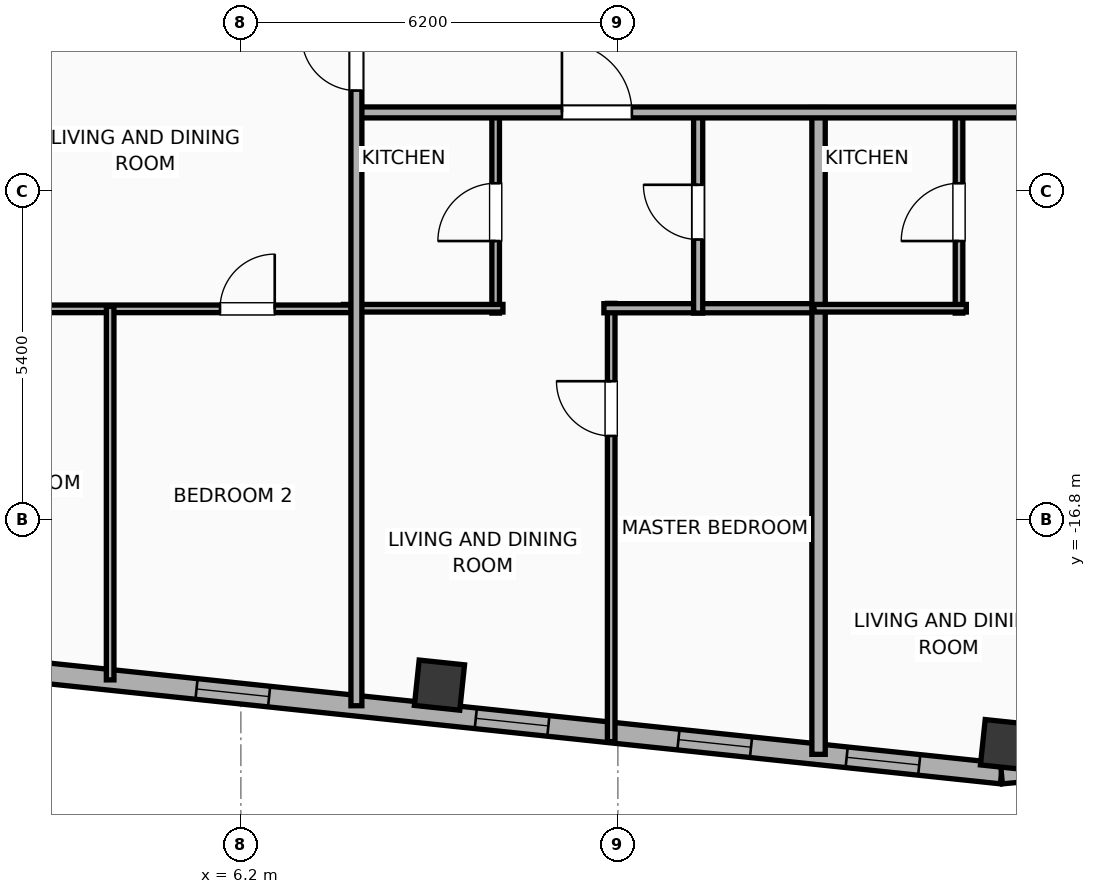
"""IFC4 building model, lengths in metres.
Left out: names, types, materials, properties, quantities, classifications, styles, units other than length and angle.
Written with IfcOpenShell. Run it as: python <this file> out.ifc"""

import sys

from ifc_helpers import new_model, si_unit, direction, frame, frame_2d, origin, origin_2d, place, context, subcontext, project, spatial, rectangle, hollow_rectangle, extrude, element, fill, save


model = new_model("IFC4")
c1 = context("Model", 3, precision=1e-05, world=origin(), true_north=direction((0.0, 1.0)))
c2 = subcontext(c1, "Body", "Model", "MODEL_VIEW")
j1 = project(units=[si_unit("LENGTHUNIT", "METRE"), si_unit("PLANEANGLEUNIT", "RADIAN")], contexts=[c1])
p1 = place(None, origin())
s1 = spatial("IfcSite", under=j1, at=p1, CompositionType="ELEMENT")
p2 = place(p1, origin())
s2 = spatial("IfcBuilding", under=s1, at=p2, CompositionType="ELEMENT")
p3 = place(p2, frame((0.0, 0.0, 260.0)))
s3 = spatial("IfcBuildingStorey", under=s2, at=p3, CompositionType="ELEMENT", Elevation=260.0)
for number, where, z_axis, x_axis in (
    (1, (9.466, -19.518, 0.0), (0.0, 0.0, 1.0), (0.995, -0.105, 0.0)),
    (2, (18.775, -20.497, 0.0), (0.0, 0.0, 1.0), (0.995, -0.105, 0.0)),
):
    element("IfcColumn", number, at=place(p3, frame(where, z_axis=z_axis, x_axis=x_axis)), inside=s3, PredefinedType="COLUMN", context=c2, shape_type="SweptSolid", body=[
        extrude(hollow_rectangle(XDim=0.75, YDim=0.75, WallThickness=0.025, at=origin_2d()), origin(), (0.0, 0.0, 1.0), 3.9),
    ])
p4 = place(p3, frame((18.708, -20.972, 0.0), z_axis=(0.0, 0.0, 1.0), x_axis=(-0.994521888554, 0.104528528102, 0.0)))
e3 = element("IfcWall", 3, at=p4, inside=s3, PredefinedType="ELEMENTEDWALL", context=c2, shape_type="SweptSolid", body=[
    extrude(rectangle(XDim=46.766, YDim=0.34, at=frame_2d((23.383, 0.0))), origin(), (0.0, 0.0, 1.0), 2.54),
])
p5 = place(p4, frame((23.833, 0.0, 0.75)))
e4 = element("IfcOpeningElement", 4, at=p5, cuts=e3, PredefinedType="OPENING", context=c2, shape_type="SweptSolid", body=[
    extrude(rectangle(XDim=2.4, YDim=1.63, at=frame_2d((1.2, 0.815))), frame((0.0, 0.18, 0.0), z_axis=(0.0, -1.0, 0.0), x_axis=(1.0, 0.0, 0.0)), (0.0, 0.0, 1.0), 0.36),
])
p6 = place(p4, frame((38.622, 0.0, 0.75)))
e5 = element("IfcOpeningElement", 5, at=p6, cuts=e3, PredefinedType="OPENING", context=c2, shape_type="SweptSolid", body=[
    extrude(rectangle(XDim=2.4, YDim=1.63, at=frame_2d((1.2, 0.815))), frame((0.0, 0.18, 0.0), z_axis=(0.0, -1.0, 0.0), x_axis=(1.0, 0.0, 0.0)), (0.0, 0.0, 1.0), 0.36),
])
p7 = place(p4, frame((44.402, 0.0, 0.75)))
e6 = element("IfcOpeningElement", 6, at=p7, cuts=e3, PredefinedType="OPENING", context=c2, shape_type="SweptSolid", body=[
    extrude(rectangle(XDim=1.2, YDim=1.63, at=frame_2d((0.6, 0.815))), frame((0.0, 0.18, 0.0), z_axis=(0.0, -1.0, 0.0), x_axis=(1.0, 0.0, 0.0)), (0.0, 0.0, 1.0), 0.36),
])
p8 = place(p4, frame((42.406, 0.0, 0.75)))
e7 = element("IfcOpeningElement", 7, at=p8, cuts=e3, PredefinedType="OPENING", context=c2, shape_type="SweptSolid", body=[
    extrude(rectangle(XDim=1.2, YDim=1.63, at=frame_2d((0.6, 0.815))), frame((0.0, 0.18, 0.0), z_axis=(0.0, -1.0, 0.0), x_axis=(1.0, 0.0, 0.0)), (0.0, 0.0, 1.0), 0.36),
])
p9 = place(p4, frame((34.933, 0.0, 0.75)))
e8 = element("IfcOpeningElement", 8, at=p9, cuts=e3, PredefinedType="OPENING", context=c2, shape_type="SweptSolid", body=[
    extrude(rectangle(XDim=1.2, YDim=1.63, at=frame_2d((0.6, 0.815))), frame((0.0, 0.18, 0.0), z_axis=(0.0, -1.0, 0.0), x_axis=(1.0, 0.0, 0.0)), (0.0, 0.0, 1.0), 0.36),
])
p10 = place(p4, frame((28.631, 0.0, 0.75)))
e9 = element("IfcOpeningElement", 9, at=p10, cuts=e3, PredefinedType="OPENING", context=c2, shape_type="SweptSolid", body=[
    extrude(rectangle(XDim=1.2, YDim=1.63, at=frame_2d((0.6, 0.815))), frame((0.0, 0.18, 0.0), z_axis=(0.0, -1.0, 0.0), x_axis=(1.0, 0.0, 0.0)), (0.0, 0.0, 1.0), 0.36),
])
p11 = place(p4, frame((30.896, 0.0, 0.75)))
e10 = element("IfcOpeningElement", 10, at=p11, cuts=e3, PredefinedType="OPENING", context=c2, shape_type="SweptSolid", body=[
    extrude(rectangle(XDim=1.2, YDim=1.63, at=frame_2d((0.6, 0.815))), frame((0.0, 0.18, 0.0), z_axis=(0.0, -1.0, 0.0), x_axis=(1.0, 0.0, 0.0)), (0.0, 0.0, 1.0), 0.36),
])
p12 = place(p4, frame((7.492, 0.0, 0.75)))
e11 = element("IfcOpeningElement", 11, at=p12, cuts=e3, PredefinedType="OPENING", context=c2, shape_type="SweptSolid", body=[
    extrude(rectangle(XDim=1.2, YDim=1.63, at=frame_2d((0.6, 0.815))), frame((0.0, 0.18, 0.0), z_axis=(0.0, -1.0, 0.0), x_axis=(1.0, 0.0, 0.0)), (0.0, 0.0, 1.0), 0.36),
])
p13 = place(p4, frame((4.141, 0.0, 0.75)))
e12 = element("IfcOpeningElement", 12, at=p13, cuts=e3, PredefinedType="OPENING", context=c2, shape_type="SweptSolid", body=[
    extrude(rectangle(XDim=1.2, YDim=1.63, at=frame_2d((0.6, 0.815))), frame((0.0, 0.18, 0.0), z_axis=(0.0, -1.0, 0.0), x_axis=(1.0, 0.0, 0.0)), (0.0, 0.0, 1.0), 0.36),
])
p14 = place(p4, frame((1.36, 0.0, 0.75)))
e13 = element("IfcOpeningElement", 13, at=p14, cuts=e3, PredefinedType="OPENING", context=c2, shape_type="SweptSolid", body=[
    extrude(rectangle(XDim=1.2, YDim=1.63, at=frame_2d((0.6, 0.815))), frame((0.0, 0.18, 0.0), z_axis=(0.0, -1.0, 0.0), x_axis=(1.0, 0.0, 0.0)), (0.0, 0.0, 1.0), 0.36),
])
p15 = place(p4, frame((20.254, 0.0, 0.75)))
e14 = element("IfcOpeningElement", 14, at=p15, cuts=e3, PredefinedType="OPENING", context=c2, shape_type="SweptSolid", body=[
    extrude(rectangle(XDim=1.2, YDim=1.63, at=frame_2d((0.6, 0.815))), frame((0.0, 0.18, 0.0), z_axis=(0.0, -1.0, 0.0), x_axis=(1.0, 0.0, 0.0)), (0.0, 0.0, 1.0), 0.36),
])
p16 = place(p4, frame((16.172, 0.0, 0.75)))
e15 = element("IfcOpeningElement", 15, at=p16, cuts=e3, PredefinedType="OPENING", context=c2, shape_type="SweptSolid", body=[
    extrude(rectangle(XDim=1.2, YDim=1.63, at=frame_2d((0.6, 0.815))), frame((0.0, 0.18, 0.0), z_axis=(0.0, -1.0, 0.0), x_axis=(1.0, 0.0, 0.0)), (0.0, 0.0, 1.0), 0.36),
])
p17 = place(p4, frame((12.11, 0.0, 0.75)))
e16 = element("IfcOpeningElement", 16, at=p17, cuts=e3, PredefinedType="OPENING", context=c2, shape_type="SweptSolid", body=[
    extrude(rectangle(XDim=1.2, YDim=1.63, at=frame_2d((0.6, 0.815))), frame((0.0, 0.18, 0.0), z_axis=(0.0, -1.0, 0.0), x_axis=(1.0, 0.0, 0.0)), (0.0, 0.0, 1.0), 0.36),
])
p18 = place(p3, frame((20.056, -20.848, 0.0), z_axis=(0.0, 0.0, 1.0), x_axis=(-0.995813013343, -0.091413579172, 0.0)))
e17 = element("IfcWall", 17, at=p18, inside=s3, PredefinedType="ELEMENTEDWALL", context=c2, shape_type="SweptSolid", body=[
    extrude(rectangle(XDim=1.354, YDim=0.34, at=frame_2d((0.677, 0.0))), origin(), (0.0, 0.0, 1.0), 2.54),
])
p19 = place(p3, frame((12.29, -20.448, 0.0), z_axis=(0.0, 0.0, 1.0), x_axis=(0.0, 1.0, 0.0)))
e18 = element("IfcWall", 18, at=p19, inside=s3, PredefinedType="PARTITIONING", context=c2, shape_type="SweptSolid", body=[
    extrude(rectangle(XDim=7.208, YDim=0.125, at=frame_2d((3.604, 0.0))), origin(), (0.0, 0.0, 1.0), 3.65),
])
p20 = place(p19, frame((5.028, 0.0, 0.0)))
e19 = element("IfcOpeningElement", 19, at=p20, cuts=e18, PredefinedType="OPENING", context=c2, shape_type="SweptSolid", body=[
    extrude(rectangle(XDim=0.9, YDim=2.05, at=frame_2d((0.45, 1.025))), frame((0.0, 0.073, 0.0), z_axis=(0.0, -1.0, 0.0), x_axis=(1.0, 0.0, 0.0)), (0.0, 0.0, 1.0), 0.145),
])
p21 = place(p3, frame((12.17, -13.32, 0.0), z_axis=(0.0, 0.0, 1.0), x_axis=(1.0, 0.0, 0.0)))
e20 = element("IfcWall", 20, at=p21, inside=s3, PredefinedType="PLUMBINGWALL", context=c2, shape_type="SweptSolid", body=[
    extrude(rectangle(XDim=3.605, YDim=0.15, at=frame_2d((1.802, 0.0))), origin(), (0.0, 0.0, 1.0), 3.65),
])
p22 = place(p3, frame((10.39, -13.4, 0.0), z_axis=(0.0, 0.0, 1.0), x_axis=(0.0, 1.0, 0.0)))
e21 = element("IfcWall", 21, at=p22, inside=s3, PredefinedType="PARTITIONING", context=c2, shape_type="SweptSolid", body=[
    extrude(rectangle(XDim=3.32, YDim=0.125, at=frame_2d((1.66, 0.0))), origin(), (0.0, 0.0, 1.0), 2.54),
])
p23 = place(p22, frame((1.185, 0.0, 0.0)))
e22 = element("IfcOpeningElement", 22, at=p23, cuts=e21, PredefinedType="OPENING", context=c2, shape_type="SweptSolid", body=[
    extrude(rectangle(XDim=0.95, YDim=2.05, at=frame_2d((0.475, 1.025))), frame((0.0, 0.073, 0.0), z_axis=(0.0, -1.0, 0.0), x_axis=(1.0, 0.0, 0.0)), (0.0, 0.0, 1.0), 0.145),
])
p24 = place(p3, frame((7.887, -13.32, 0.0), z_axis=(0.0, 0.0, 1.0), x_axis=(1.0, 0.0, 0.0)))
e23 = element("IfcWall", 23, at=p24, inside=s3, PredefinedType="PARTITIONING", context=c2, shape_type="SweptSolid", body=[
    extrude(rectangle(XDim=2.623, YDim=0.125, at=frame_2d((1.311, 0.0))), origin(), (0.0, 0.0, 1.0), 3.65),
])
p25 = place(p3, frame((13.72, -13.4, 0.0), z_axis=(0.0, 0.0, 1.0), x_axis=(0.0, 1.0, 0.0)))
e24 = element("IfcWall", 24, at=p25, inside=s3, PredefinedType="PLUMBINGWALL", context=c2, shape_type="SweptSolid", body=[
    extrude(rectangle(XDim=3.32, YDim=0.15, at=frame_2d((1.66, 0.0))), origin(), (0.0, 0.0, 1.0), 3.65),
])
p26 = place(p25, frame((1.21, 0.0, 0.0)))
e25 = element("IfcOpeningElement", 25, at=p26, cuts=e24, PredefinedType="OPENING", context=c2, shape_type="SweptSolid", body=[
    extrude(rectangle(XDim=0.9, YDim=2.05, at=frame_2d((0.45, 1.025))), frame((0.0, 0.085, 0.0), z_axis=(0.0, -1.0, 0.0), x_axis=(1.0, 0.0, 0.0)), (0.0, 0.0, 1.0), 0.17),
])
p27 = place(p3, frame((15.7, -20.656, 0.0), z_axis=(0.0, 0.0, 1.0), x_axis=(0.0, 1.0, 0.0)))
e26 = element("IfcWall", 26, at=p27, inside=s3, PredefinedType="PARTITIONING", context=c2, shape_type="SweptSolid", body=[
    extrude(rectangle(XDim=10.636, YDim=0.22, at=frame_2d((5.318, 0.0))), origin(), (0.0, 0.0, 1.0), 3.65),
])
p28 = place(p3, frame((18.01, -13.4, 0.0), z_axis=(0.0, 0.0, 1.0), x_axis=(0.0, 1.0, 0.0)))
e27 = element("IfcWall", 27, at=p28, inside=s3, PredefinedType="PARTITIONING", context=c2, shape_type="SweptSolid", body=[
    extrude(rectangle(XDim=3.32, YDim=0.125, at=frame_2d((1.66, 0.0))), origin(), (0.0, 0.0, 1.0), 3.65),
])
p29 = place(p28, frame((1.185, 0.0, 0.0)))
e28 = element("IfcOpeningElement", 28, at=p29, cuts=e27, PredefinedType="OPENING", context=c2, shape_type="SweptSolid", body=[
    extrude(rectangle(XDim=0.95, YDim=2.05, at=frame_2d((0.475, 1.025))), frame((0.0, 0.073, 0.0), z_axis=(0.0, -1.0, 0.0), x_axis=(1.0, 0.0, 0.0)), (0.0, 0.0, 1.0), 0.145),
])
p30 = place(p3, frame((15.625, -13.32, 0.0), z_axis=(0.0, 0.0, 1.0), x_axis=(1.0, 0.0, 0.0)))
e29 = element("IfcWall", 29, at=p30, inside=s3, PredefinedType="PARTITIONING", context=c2, shape_type="SweptSolid", body=[
    extrude(rectangle(XDim=2.505, YDim=0.125, at=frame_2d((1.252, 0.0))), origin(), (0.0, 0.0, 1.0), 3.65),
])
p31 = place(p3, frame((8.08, -10.1, 0.0), z_axis=(0.0, 0.0, 1.0), x_axis=(1.0, 0.0, 0.0)))
e30 = element("IfcWall", 30, at=p31, inside=s3, PredefinedType="PARTITIONING", context=c2, shape_type="SweptSolid", body=[
    extrude(rectangle(XDim=15.236, YDim=0.18, at=frame_2d((7.618, 0.0))), origin(), (0.0, 0.0, 1.0), 3.65),
])
p32 = place(p31, frame((3.4, 0.0, 0.0)))
e31 = element("IfcOpeningElement", 31, at=p32, cuts=e30, PredefinedType="OPENING", context=c2, shape_type="SweptSolid", body=[
    extrude(rectangle(XDim=1.15, YDim=2.05, at=frame_2d((0.575, 1.025))), frame((0.0, 0.1, 0.0), z_axis=(0.0, -1.0, 0.0), x_axis=(1.0, 0.0, 0.0)), (0.0, 0.0, 1.0), 0.2),
])
p33 = place(p31, frame((11.05, 0.0, 0.0)))
e32 = element("IfcOpeningElement", 32, at=p33, cuts=e30, PredefinedType="OPENING", context=c2, shape_type="SweptSolid", body=[
    extrude(rectangle(XDim=1.15, YDim=2.05, at=frame_2d((0.575, 1.025))), frame((0.0, 0.1, 0.0), z_axis=(0.0, -1.0, 0.0), x_axis=(1.0, 0.0, 0.0)), (0.0, 0.0, 1.0), 0.2),
])
p34 = place(p3, frame((0.02, -13.33, 0.0), z_axis=(0.0, 0.0, 1.0), x_axis=(1.0, 0.0, 0.0)))
e33 = element("IfcWall", 33, at=p34, inside=s3, PredefinedType="PARTITIONING", context=c2, shape_type="SweptSolid", body=[
    extrude(rectangle(XDim=7.992, YDim=0.125, at=frame_2d((3.996, 0.0))), origin(), (0.0, 0.0, 1.0), 3.65),
])
p35 = place(p34, frame((1.323, 0.0, 0.0)))
e34 = element("IfcOpeningElement", 34, at=p35, cuts=e33, PredefinedType="OPENING", context=c2, shape_type="SweptSolid", body=[
    extrude(rectangle(XDim=0.9, YDim=2.05, at=frame_2d((0.45, 1.025))), frame((0.0, 0.073, 0.0), z_axis=(0.0, -1.0, 0.0), x_axis=(1.0, 0.0, 0.0)), (0.0, 0.0, 1.0), 0.145),
])
p36 = place(p34, frame((5.837, 0.0, 0.0)))
e35 = element("IfcOpeningElement", 35, at=p36, cuts=e33, PredefinedType="OPENING", context=c2, shape_type="SweptSolid", body=[
    extrude(rectangle(XDim=0.9, YDim=2.05, at=frame_2d((0.45, 1.025))), frame((0.0, 0.073, 0.0), z_axis=(0.0, -1.0, 0.0), x_axis=(1.0, 0.0, 0.0)), (0.0, 0.0, 1.0), 0.145),
])
p37 = place(p3, frame((4.05, -19.432, 0.0), z_axis=(0.0, 0.0, 1.0), x_axis=(0.0, 1.0, 0.0)))
e36 = element("IfcWall", 36, at=p37, inside=s3, PredefinedType="PARTITIONING", context=c2, shape_type="SweptSolid", body=[
    extrude(rectangle(XDim=6.142, YDim=0.125, at=frame_2d((3.071, 0.0))), origin(), (0.0, 0.0, 1.0), 3.65),
])
p38 = place(p3, frame((8.1, -19.857, 0.0), z_axis=(0.0, 0.0, 1.0), x_axis=(0.0, 1.0, 0.0)))
e37 = element("IfcWall", 37, at=p38, inside=s3, PredefinedType="PARTITIONING", context=c2, shape_type="SweptSolid", body=[
    extrude(rectangle(XDim=11.367, YDim=0.18, at=frame_2d((5.684, 0.0))), origin(), (0.0, 0.0, 1.0), 3.65),
])
p39 = place(p38, frame((10.117, 0.0, 0.0)))
e38 = element("IfcOpeningElement", 38, at=p39, cuts=e37, PredefinedType="OPENING", context=c2, shape_type="SweptSolid", body=[
    extrude(rectangle(XDim=0.9, YDim=2.05, at=frame_2d((0.45, 1.025))), frame((0.0, 0.1, 0.0), z_axis=(0.0, -1.0, 0.0), x_axis=(1.0, 0.0, 0.0)), (0.0, 0.0, 1.0), 0.2),
])
p40 = place(p12, origin())
e39 = element("IfcWindow", 39, at=p40, inside=s3, PartitioningType="SINGLE_PANEL", PredefinedType="WINDOW", context=c2, shape_type="SweptSolid", body=[
    extrude(rectangle(XDim=1.2, YDim=1.63, at=frame_2d((0.6, 0.815))), frame((0.0, 0.03, 0.0), z_axis=(0.0, -1.0, 0.0), x_axis=(1.0, 0.0, 0.0)), (0.0, 0.0, 1.0), 0.06),
])
fill(e11, e39)
p41 = place(p13, origin())
e40 = element("IfcWindow", 40, at=p41, inside=s3, PartitioningType="SINGLE_PANEL", PredefinedType="WINDOW", context=c2, shape_type="SweptSolid", body=[
    extrude(rectangle(XDim=1.2, YDim=1.63, at=frame_2d((0.6, 0.815))), frame((0.0, 0.03, 0.0), z_axis=(0.0, -1.0, 0.0), x_axis=(1.0, 0.0, 0.0)), (0.0, 0.0, 1.0), 0.06),
])
fill(e12, e40)
p42 = place(p14, origin())
e41 = element("IfcWindow", 41, at=p42, inside=s3, PartitioningType="SINGLE_PANEL", PredefinedType="WINDOW", context=c2, shape_type="SweptSolid", body=[
    extrude(rectangle(XDim=1.2, YDim=1.63, at=frame_2d((0.6, 0.815))), frame((0.0, 0.03, 0.0), z_axis=(0.0, -1.0, 0.0), x_axis=(1.0, 0.0, 0.0)), (0.0, 0.0, 1.0), 0.06),
])
fill(e13, e41)
p43 = place(p17, origin())
e42 = element("IfcWindow", 42, at=p43, inside=s3, PartitioningType="SINGLE_PANEL", PredefinedType="WINDOW", context=c2, shape_type="SweptSolid", body=[
    extrude(rectangle(XDim=1.2, YDim=1.63, at=frame_2d((0.6, 0.815))), frame((0.0, 0.03, 0.0), z_axis=(0.0, -1.0, 0.0), x_axis=(1.0, 0.0, 0.0)), (0.0, 0.0, 1.0), 0.06),
])
fill(e16, e42)
p44 = place(p20, origin())
e43 = element("IfcDoor", 43, at=p44, inside=s3, OperationType="SINGLE_SWING_RIGHT", PredefinedType="DOOR", context=c2, shape_type="SweptSolid", body=[
    extrude(rectangle(XDim=0.9, YDim=2.05, at=frame_2d((0.45, 1.025))), frame((0.0, 0.025, 0.0), z_axis=(0.0, -1.0, 0.0), x_axis=(1.0, 0.0, 0.0)), (0.0, 0.0, 1.0), 0.05),
])
fill(e19, e43)
p45 = place(p23, origin())
e44 = element("IfcDoor", 44, at=p45, inside=s3, OperationType="SINGLE_SWING_LEFT", PredefinedType="DOOR", context=c2, shape_type="SweptSolid", body=[
    extrude(rectangle(XDim=0.95, YDim=2.05, at=frame_2d((0.475, 1.025))), frame((0.0, 0.025, 0.0), z_axis=(0.0, -1.0, 0.0), x_axis=(1.0, 0.0, 0.0)), (0.0, 0.0, 1.0), 0.05),
])
fill(e22, e44)
p46 = place(p26, origin())
e45 = element("IfcDoor", 45, at=p46, inside=s3, OperationType="SINGLE_SWING_RIGHT", PredefinedType="DOOR", context=c2, shape_type="SweptSolid", body=[
    extrude(rectangle(XDim=0.9, YDim=2.05, at=frame_2d((0.45, 1.025))), frame((0.0, 0.025, 0.0), z_axis=(0.0, -1.0, 0.0), x_axis=(1.0, 0.0, 0.0)), (0.0, 0.0, 1.0), 0.05),
])
fill(e25, e45)
p47 = place(p29, origin())
e46 = element("IfcDoor", 46, at=p47, inside=s3, OperationType="SINGLE_SWING_LEFT", PredefinedType="DOOR", context=c2, shape_type="SweptSolid", body=[
    extrude(rectangle(XDim=0.95, YDim=2.05, at=frame_2d((0.475, 1.025))), frame((0.0, 0.025, 0.0), z_axis=(0.0, -1.0, 0.0), x_axis=(1.0, 0.0, 0.0)), (0.0, 0.0, 1.0), 0.05),
])
fill(e28, e46)
p48 = place(p32, origin())
e47 = element("IfcDoor", 47, at=p48, inside=s3, OperationType="SINGLE_SWING_LEFT", PredefinedType="DOOR", context=c2, shape_type="SweptSolid", body=[
    extrude(rectangle(XDim=1.15, YDim=2.05, at=frame_2d((0.575, 1.025))), frame((0.0, 0.025, 0.0), z_axis=(0.0, -1.0, 0.0), x_axis=(1.0, 0.0, 0.0)), (0.0, 0.0, 1.0), 0.05),
])
fill(e31, e47)
p49 = place(p36, origin())
e48 = element("IfcDoor", 48, at=p49, inside=s3, OperationType="SINGLE_SWING_RIGHT", PredefinedType="DOOR", context=c2, shape_type="SweptSolid", body=[
    extrude(rectangle(XDim=0.9, YDim=2.05, at=frame_2d((0.45, 1.025))), frame((0.0, 0.025, 0.0), z_axis=(0.0, -1.0, 0.0), x_axis=(1.0, 0.0, 0.0)), (0.0, 0.0, 1.0), 0.05),
])
fill(e35, e48)
p50 = place(p39, origin())
e49 = element("IfcDoor", 49, at=p50, inside=s3, OperationType="SINGLE_SWING_RIGHT", PredefinedType="DOOR", context=c2, shape_type="SweptSolid", body=[
    extrude(rectangle(XDim=0.9, YDim=2.05, at=frame_2d((0.45, 1.025))), frame((0.0, 0.025, 0.0), z_axis=(0.0, -1.0, 0.0), x_axis=(1.0, 0.0, 0.0)), (0.0, 0.0, 1.0), 0.05),
])
fill(e38, e49)
save(model, sys.argv[1])
